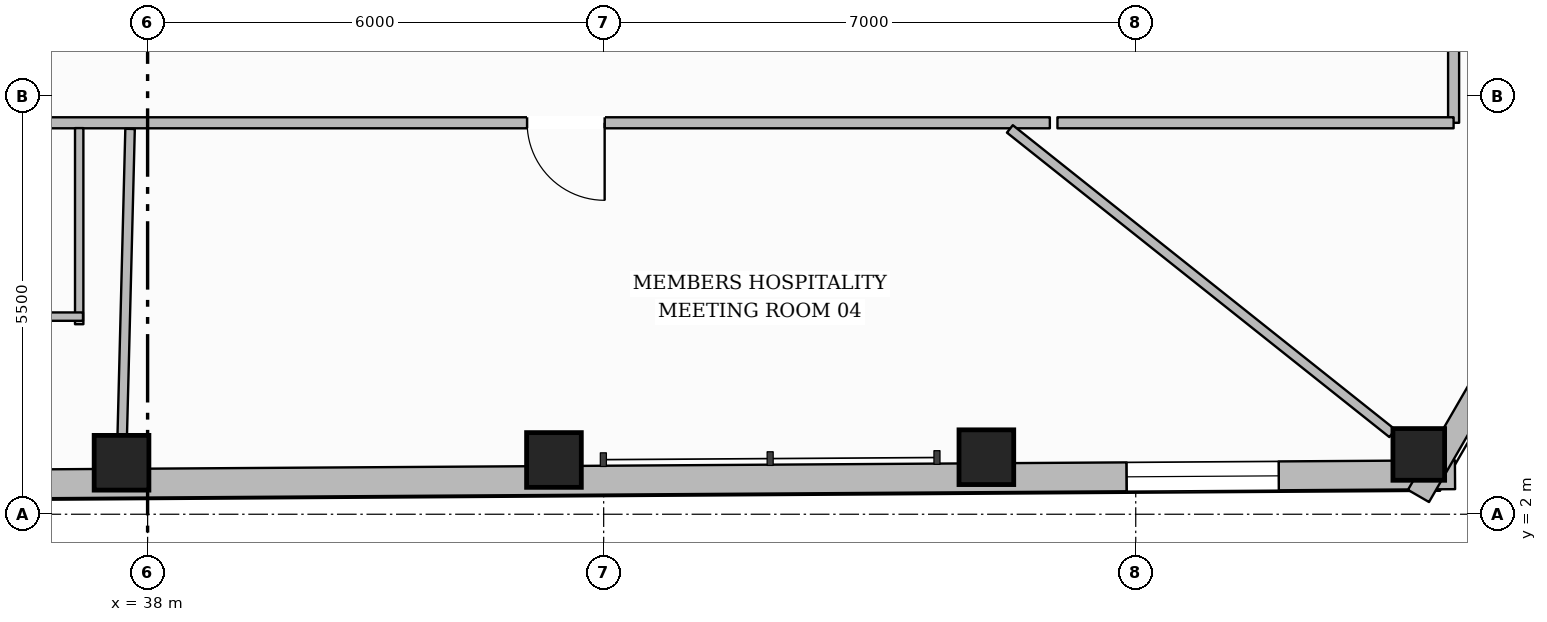
"""IFC4 building model, lengths in metres.
Left out: names, types, materials, properties, quantities, classifications, styles, units other than length and angle.
Written with IfcOpenShell. Run it as: python <this file> out.ifc"""

import sys

from ifc_helpers import new_model, si_unit, direction, frame, frame_2d, origin, origin_2d, place, context, subcontext, project, spatial, rectangle, hollow_rectangle, extrude, element, fill, save


model = new_model("IFC4")
c1 = context("Model", 3, precision=1e-05, world=origin(), true_north=direction((0.0, 1.0)))
c2 = subcontext(c1, "Body", "Model", "MODEL_VIEW")
j1 = project(units=[si_unit("LENGTHUNIT", "METRE"), si_unit("PLANEANGLEUNIT", "RADIAN")], contexts=[c1])
p1 = place(None, origin())
s1 = spatial("IfcSite", under=j1, at=p1, CompositionType="ELEMENT")
p2 = place(p1, origin())
s2 = spatial("IfcBuilding", under=s1, at=p2, CompositionType="ELEMENT")
p3 = place(p2, frame((0.0, 0.0, 80.5)))
s3 = spatial("IfcBuildingStorey", under=s2, at=p3, CompositionType="ELEMENT", Elevation=80.5)
for number, where, z_axis, x_axis in (
    (1, (37.657, 2.677, 0.0), (0.0, 0.0, 1.0), (1.0, 0.0, 0.0)),
    (2, (43.346, 2.714, 0.0), (0.0, 0.0, 1.0), (1.0, 0.0, 0.0)),
    (3, (49.035, 2.75, 0.0), (0.0, 0.0, 1.0), (1.0, 0.0, 0.0)),
):
    element("IfcColumn", number, at=place(p3, frame(where, z_axis=z_axis, x_axis=x_axis)), inside=s3, PredefinedType="COLUMN", context=c2, shape_type="SweptSolid", body=[
        extrude(hollow_rectangle(XDim=0.72, YDim=0.72, WallThickness=0.032, at=origin_2d()), origin(), (0.0, 0.0, 1.0), 4.75),
    ])
p4 = place(p3, frame((54.724, 2.787, 0.0), z_axis=(0.0, 0.0, 1.0), x_axis=(1.0, 0.0, 0.0)))
e4 = element("IfcColumn", 4, at=p4, inside=s3, PredefinedType="COLUMN", context=c2, shape_type="SweptSolid", body=[
    extrude(hollow_rectangle(XDim=0.68, YDim=0.68, WallThickness=0.03, at=origin_2d()), origin(), (0.0, 0.0, 1.0), 4.75),
])
p5 = place(p3, frame((55.2, 2.52, 0.0), z_axis=(0.0, 0.0, 1.0), x_axis=(-0.999979379683, -0.006421854009, 0.0)))
e5 = element("IfcWall", 5, at=p5, inside=s3, PredefinedType="STANDARD", context=c2, shape_type="SweptSolid", body=[
    extrude(rectangle(XDim=35.09, YDim=0.38, at=frame_2d((17.545, 0.0))), origin(), (0.0, 0.0, 1.0), 4.209),
])
p6 = place(p5, frame((30.765, 0.0, 0.65)))
e6 = element("IfcOpeningElement", 6, at=p6, cuts=e5, PredefinedType="OPENING", context=c2, shape_type="SweptSolid", body=[
    extrude(rectangle(XDim=2.0, YDim=2.25, at=frame_2d((1.0, 1.125))), frame((0.0, 0.2, 0.0), z_axis=(0.0, -1.0, 0.0), x_axis=(1.0, 0.0, 0.0)), (0.0, 0.0, 1.0), 0.4),
])
p7 = place(p5, frame((2.319, 0.0, 0.65)))
e7 = element("IfcOpeningElement", 7, at=p7, cuts=e5, PredefinedType="OPENING", context=c2, shape_type="SweptSolid", body=[
    extrude(rectangle(XDim=2.0, YDim=2.25, at=frame_2d((1.0, 1.125))), frame((0.0, 0.2, 0.0), z_axis=(0.0, -1.0, 0.0), x_axis=(1.0, 0.0, 0.0)), (0.0, 0.0, 1.0), 0.4),
])
p8 = place(p3, frame((61.74, 14.375, 0.0), z_axis=(0.0, 0.0, 1.0), x_axis=(-0.50077538948, -0.865577269394, 0.0)))
e8 = element("IfcWall", 8, at=p8, inside=s3, PredefinedType="STANDARD", context=c2, shape_type="SweptSolid", body=[
    extrude(rectangle(XDim=14.019, YDim=0.32, at=frame_2d((7.01, 0.0))), origin(), (0.0, 0.0, 1.0), 4.209),
])
p9 = place(p8, frame((6.41, 0.0, 0.65)))
e9 = element("IfcOpeningElement", 9, at=p9, cuts=e8, PredefinedType="OPENING", context=c2, shape_type="SweptSolid", body=[
    extrude(rectangle(XDim=1.2, YDim=1.7, at=frame_2d((0.6, 0.85))), frame((0.0, 0.17, 0.0), z_axis=(0.0, -1.0, 0.0), x_axis=(1.0, 0.0, 0.0)), (0.0, 0.0, 1.0), 0.34),
])
p10 = place(p3, frame((55.182, 9.15, 0.0), z_axis=(0.0, 0.0, 1.0), x_axis=(0.0, -1.0, 0.0)))
e10 = element("IfcWall", 10, at=p10, inside=s3, PredefinedType="PARTITIONING", context=c2, shape_type="SweptSolid", body=[
    extrude(rectangle(XDim=2.0, YDim=0.145, at=frame_2d((1.0, 0.0))), origin(), (0.0, 0.0, 1.0), 4.75),
])
p11 = place(p3, frame((55.182, 7.15, 0.0), z_axis=(0.0, 0.0, 1.0), x_axis=(-1.0, 0.0, 0.0)))
e11 = element("IfcWall", 11, at=p11, inside=s3, PredefinedType="PARTITIONING", context=c2, shape_type="SweptSolid", body=[
    extrude(rectangle(XDim=5.212, YDim=0.145, at=frame_2d((2.606, 0.0))), origin(), (0.0, 0.0, 1.0), 4.75),
])
p12 = place(p3, frame((49.87, 7.15, 0.0), z_axis=(0.0, 0.0, 1.0), x_axis=(-1.0, 0.0, 0.0)))
e12 = element("IfcWall", 12, at=p12, inside=s3, PredefinedType="PARTITIONING", context=c2, shape_type="SweptSolid", body=[
    extrude(rectangle(XDim=23.74, YDim=0.145, at=frame_2d((11.87, 0.0))), origin(), (0.0, 0.0, 1.0), 4.75),
])
p13 = place(p12, frame((18.43, 0.0, 0.0)))
e13 = element("IfcOpeningElement", 13, at=p13, cuts=e12, PredefinedType="OPENING", context=c2, shape_type="SweptSolid", body=[
    extrude(rectangle(XDim=0.88, YDim=2.1, at=frame_2d((0.44, 1.05))), frame((0.0, 0.083, 0.0), z_axis=(0.0, -1.0, 0.0), x_axis=(1.0, 0.0, 0.0)), (0.0, 0.0, 1.0), 0.165),
])
p14 = place(p12, frame((15.91, 0.0, 0.0)))
e14 = element("IfcOpeningElement", 14, at=p14, cuts=e12, PredefinedType="OPENING", context=c2, shape_type="SweptSolid", body=[
    extrude(rectangle(XDim=0.88, YDim=2.1, at=frame_2d((0.44, 1.05))), frame((0.0, 0.083, 0.0), z_axis=(0.0, -1.0, 0.0), x_axis=(1.0, 0.0, 0.0)), (0.0, 0.0, 1.0), 0.165),
])
p15 = place(p12, frame((13.45, 0.0, 0.0)))
e15 = element("IfcOpeningElement", 15, at=p15, cuts=e12, PredefinedType="OPENING", context=c2, shape_type="SweptSolid", body=[
    extrude(rectangle(XDim=0.96, YDim=2.1, at=frame_2d((0.48, 1.05))), frame((0.0, 0.083, 0.0), z_axis=(0.0, -1.0, 0.0), x_axis=(1.0, 0.0, 0.0)), (0.0, 0.0, 1.0), 0.165),
])
p16 = place(p12, frame((5.857, 0.0, 0.0)))
e16 = element("IfcOpeningElement", 16, at=p16, cuts=e12, PredefinedType="OPENING", context=c2, shape_type="SweptSolid", body=[
    extrude(rectangle(XDim=1.02, YDim=2.15, at=frame_2d((0.51, 1.075))), frame((0.0, 0.083, 0.0), z_axis=(0.0, -1.0, 0.0), x_axis=(1.0, 0.0, 0.0)), (0.0, 0.0, 1.0), 0.165),
])
p17 = place(p3, frame((37.1, 4.5, 0.0), z_axis=(0.0, 0.0, 1.0), x_axis=(0.0, 1.0, 0.0)))
e17 = element("IfcWall", 17, at=p17, inside=s3, PredefinedType="PLUMBINGWALL", context=c2, shape_type="SweptSolid", body=[
    extrude(rectangle(XDim=2.58, YDim=0.11, at=frame_2d((1.29, 0.0))), origin(), (0.0, 0.0, 1.0), 4.75),
])
p18 = place(p3, frame((29.69, 4.6, 0.0), z_axis=(0.0, 0.0, 1.0), x_axis=(1.0, 0.0, 0.0)))
e18 = element("IfcWall", 18, at=p18, inside=s3, PredefinedType="PLUMBINGWALL", context=c2, shape_type="SweptSolid", body=[
    extrude(rectangle(XDim=7.46, YDim=0.11, at=frame_2d((3.73, 0.0))), origin(), (0.0, 0.0, 1.0), 4.438),
])
p19 = place(p3, frame((37.769, 7.07, 0.0), z_axis=(0.0, 0.0, 1.0), x_axis=(-0.025533139841, -0.999673976239, 0.0)))
e19 = element("IfcWall", 19, at=p19, inside=s3, PredefinedType="PARTITIONING", context=c2, shape_type="SweptSolid", body=[
    extrude(rectangle(XDim=4.025, YDim=0.125, at=frame_2d((2.013, 0.0))), origin(), (0.0, 0.0, 1.0), 4.291),
])
p20 = place(p3, frame((49.344, 7.07, 0.0), z_axis=(0.0, 0.0, 1.0), x_axis=(0.782366462382, -0.622818367215, 0.0)))
e20 = element("IfcWall", 20, at=p20, inside=s3, PredefinedType="PARTITIONING", context=c2, shape_type="SweptSolid", body=[
    extrude(rectangle(XDim=6.431, YDim=0.125, at=frame_2d((3.216, 0.0))), origin(), (0.0, 0.0, 1.0), 4.291),
])
p21 = place(p7, origin())
e21 = element("IfcWindow", 21, at=p21, inside=s3, PartitioningType="SINGLE_PANEL", PredefinedType="WINDOW", context=c2, shape_type="SweptSolid", body=[
    extrude(rectangle(XDim=2.0, YDim=2.25, at=frame_2d((1.0, 1.125))), frame((0.0, 0.03, 0.0), z_axis=(0.0, -1.0, 0.0), x_axis=(1.0, 0.0, 0.0)), (0.0, 0.0, 1.0), 0.06),
])
fill(e7, e21)
p22 = place(p16, origin())
e22 = element("IfcDoor", 22, at=p22, inside=s3, OperationType="SINGLE_SWING_LEFT", PredefinedType="DOOR", context=c2, shape_type="SweptSolid", body=[
    extrude(rectangle(XDim=1.02, YDim=2.15, at=frame_2d((0.51, 1.075))), frame((0.0, 0.025, 0.0), z_axis=(0.0, -1.0, 0.0), x_axis=(1.0, 0.0, 0.0)), (0.0, 0.0, 1.0), 0.05),
])
fill(e16, e22)
save(model, sys.argv[1])
